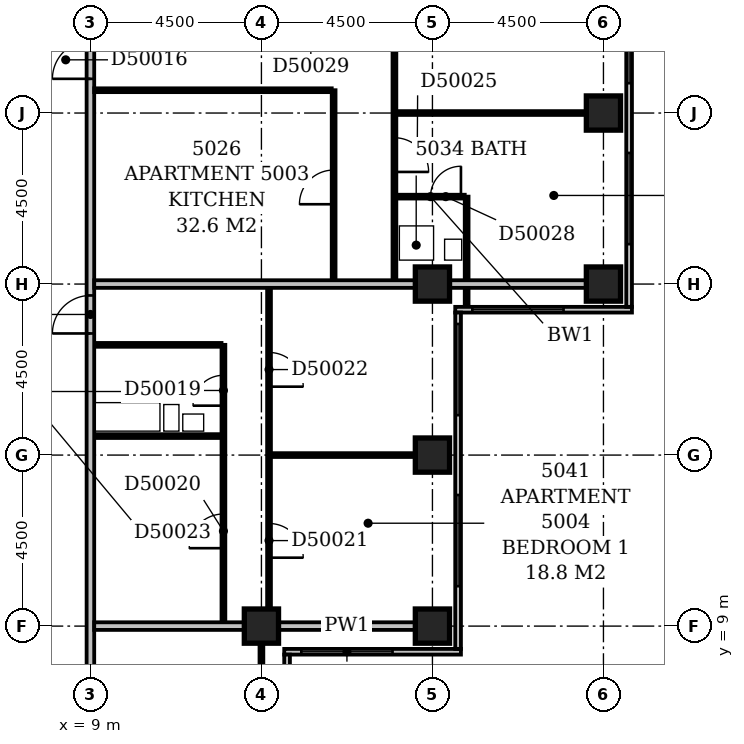
"""IFC4 building model, lengths in metres.
Left out: names, types, materials, properties, quantities, classifications, styles, units other than length and angle.
Written with IfcOpenShell. Run it as: python <this file> out.ifc"""

import sys

from ifc_helpers import new_model, si_unit, direction, frame, frame_2d, origin, origin_2d, place, context, subcontext, project, spatial, rectangle, extrude, element, fill, save


model = new_model("IFC4")
c1 = context("Model", 3, precision=1e-05, world=origin(), true_north=direction((0.0, 1.0)))
c2 = subcontext(c1, "Body", "Model", "MODEL_VIEW")
j1 = project(units=[si_unit("LENGTHUNIT", "METRE"), si_unit("PLANEANGLEUNIT", "RADIAN")], contexts=[c1])
p1 = place(None, origin())
s1 = spatial("IfcSite", under=j1, at=p1, CompositionType="ELEMENT")
p2 = place(p1, origin())
s2 = spatial("IfcBuilding", under=s1, at=p2, CompositionType="ELEMENT")
p3 = place(p2, frame((0.0, 0.0, 197.0)))
s3 = spatial("IfcBuildingStorey", under=s2, at=p3, CompositionType="ELEMENT", Elevation=197.0)
for number, where, z_axis, x_axis in (
    (1, (13.5, 9.0, -0.3), (0.0, 0.0, 1.0), (1.0, 0.0, 0.0)),
    (2, (18.0, 9.0, -0.3), (0.0, 0.0, 1.0), (1.0, 0.0, 0.0)),
    (3, (18.0, 13.5, -0.3), (0.0, 0.0, 1.0), (1.0, 0.0, 0.0)),
    (4, (18.0, 18.0, -0.3), (0.0, 0.0, 1.0), (1.0, 0.0, 0.0)),
    (5, (22.5, 18.0, -0.3), (0.0, 0.0, 1.0), (1.0, 0.0, 0.0)),
    (6, (22.5, 22.5, -0.3), (0.0, 0.0, 1.0), (1.0, 0.0, 0.0)),
):
    element("IfcColumn", number, at=place(p3, frame(where, z_axis=z_axis, x_axis=x_axis)), inside=s3, PredefinedType="COLUMN", context=c2, shape_type="SweptSolid", body=[
        extrude(rectangle(XDim=0.9, YDim=0.9, at=origin_2d()), origin(), (0.0, 0.0, 1.0), 3.6),
    ])
p4 = place(p3, frame((14.175, 3.9, 0.0), z_axis=(0.0, 0.0, 1.0), x_axis=(0.0, 1.0, 0.0)))
e7 = element("IfcWall", 7, at=p4, inside=s3, PredefinedType="STANDARD", context=c2, shape_type="SweptSolid", body=[
    extrude(rectangle(XDim=4.35, YDim=0.15, at=frame_2d((2.175, 0.0))), origin(), (0.0, 0.0, 1.0), 2.7),
])
p5 = place(p4, frame((1.65, 0.0, 0.6)))
e8 = element("IfcOpeningElement", 8, at=p5, cuts=e7, PredefinedType="OPENING", context=c2, shape_type="SweptSolid", body=[
    extrude(rectangle(XDim=2.4, YDim=1.8, at=frame_2d((1.2, 0.9))), frame((0.0, 0.087, 0.0), z_axis=(0.0, -1.0, 0.0), x_axis=(1.0, 0.0, 0.0)), (0.0, 0.0, 1.0), 0.174),
])
p6 = place(p3, frame((14.1, 8.325, 0.0), z_axis=(0.0, 0.0, 1.0), x_axis=(1.0, 0.0, 0.0)))
e9 = element("IfcWall", 9, at=p6, inside=s3, PredefinedType="STANDARD", context=c2, shape_type="SweptSolid", body=[
    extrude(rectangle(XDim=4.65, YDim=0.15, at=frame_2d((2.325, 0.0))), origin(), (0.0, 0.0, 1.0), 2.7),
])
p7 = place(p6, frame((0.45, 0.0, 0.6)))
e10 = element("IfcOpeningElement", 10, at=p7, cuts=e9, PredefinedType="OPENING", context=c2, shape_type="SweptSolid", body=[
    extrude(rectangle(XDim=2.4, YDim=1.8, at=frame_2d((1.2, 0.9))), frame((0.0, 0.087, 0.0), z_axis=(0.0, -1.0, 0.0), x_axis=(1.0, 0.0, 0.0)), (0.0, 0.0, 1.0), 0.174),
])
p8 = place(p3, frame((18.675, 8.4, 0.0), z_axis=(0.0, 0.0, 1.0), x_axis=(0.0, 1.0, 0.0)))
e11 = element("IfcWall", 11, at=p8, inside=s3, PredefinedType="STANDARD", context=c2, shape_type="SweptSolid", body=[
    extrude(rectangle(XDim=8.85, YDim=0.15, at=frame_2d((4.425, 0.0))), origin(), (0.0, 0.0, 1.0), 2.7),
])
p9 = place(p8, frame((1.65, 0.0, 0.6)))
e12 = element("IfcOpeningElement", 12, at=p9, cuts=e11, PredefinedType="OPENING", context=c2, shape_type="SweptSolid", body=[
    extrude(rectangle(XDim=2.4, YDim=1.8, at=frame_2d((1.2, 0.9))), frame((0.0, 0.087, 0.0), z_axis=(0.0, -1.0, 0.0), x_axis=(1.0, 0.0, 0.0)), (0.0, 0.0, 1.0), 0.174),
])
p10 = place(p8, frame((6.15, 0.0, 0.6)))
e13 = element("IfcOpeningElement", 13, at=p10, cuts=e11, PredefinedType="OPENING", context=c2, shape_type="SweptSolid", body=[
    extrude(rectangle(XDim=2.4, YDim=1.8, at=frame_2d((1.2, 0.9))), frame((0.0, 0.087, 0.0), z_axis=(0.0, -1.0, 0.0), x_axis=(1.0, 0.0, 0.0)), (0.0, 0.0, 1.0), 0.174),
])
p11 = place(p3, frame((18.6, 17.325, 0.0), z_axis=(0.0, 0.0, 1.0), x_axis=(1.0, 0.0, 0.0)))
e14 = element("IfcWall", 14, at=p11, inside=s3, PredefinedType="STANDARD", context=c2, shape_type="SweptSolid", body=[
    extrude(rectangle(XDim=4.65, YDim=0.15, at=frame_2d((2.325, 0.0))), origin(), (0.0, 0.0, 1.0), 2.7),
])
p12 = place(p11, frame((0.45, 0.0, 0.6)))
e15 = element("IfcOpeningElement", 15, at=p12, cuts=e14, PredefinedType="OPENING", context=c2, shape_type="SweptSolid", body=[
    extrude(rectangle(XDim=2.4, YDim=1.8, at=frame_2d((1.2, 0.9))), frame((0.0, 0.087, 0.0), z_axis=(0.0, -1.0, 0.0), x_axis=(1.0, 0.0, 0.0)), (0.0, 0.0, 1.0), 0.174),
])
p13 = place(p3, frame((23.175, 17.4, 0.0), z_axis=(0.0, 0.0, 1.0), x_axis=(0.0, 1.0, 0.0)))
e16 = element("IfcWall", 16, at=p13, inside=s3, PredefinedType="STANDARD", context=c2, shape_type="SweptSolid", body=[
    extrude(rectangle(XDim=17.85, YDim=0.15, at=frame_2d((8.925, 0.0))), origin(), (0.0, 0.0, 1.0), 2.7),
])
p14 = place(p13, frame((1.65, 0.0, 0.6)))
e17 = element("IfcOpeningElement", 17, at=p14, cuts=e16, PredefinedType="OPENING", context=c2, shape_type="SweptSolid", body=[
    extrude(rectangle(XDim=2.4, YDim=1.8, at=frame_2d((1.2, 0.9))), frame((0.0, 0.087, 0.0), z_axis=(0.0, -1.0, 0.0), x_axis=(1.0, 0.0, 0.0)), (0.0, 0.0, 1.0), 0.174),
])
p15 = place(p13, frame((5.885, 0.0, 0.6)))
e18 = element("IfcOpeningElement", 18, at=p15, cuts=e16, PredefinedType="OPENING", context=c2, shape_type="SweptSolid", body=[
    extrude(rectangle(XDim=2.4, YDim=1.8, at=frame_2d((1.2, 0.9))), frame((0.0, 0.087, 0.0), z_axis=(0.0, -1.0, 0.0), x_axis=(1.0, 0.0, 0.0)), (0.0, 0.0, 1.0), 0.174),
])
p16 = place(p13, frame((10.65, 0.0, 0.6)))
e19 = element("IfcOpeningElement", 19, at=p16, cuts=e16, PredefinedType="OPENING", context=c2, shape_type="SweptSolid", body=[
    extrude(rectangle(XDim=2.4, YDim=1.8, at=frame_2d((1.2, 0.9))), frame((0.0, 0.087, 0.0), z_axis=(0.0, -1.0, 0.0), x_axis=(1.0, 0.0, 0.0)), (0.0, 0.0, 1.0), 0.174),
])
p17 = place(p13, frame((15.15, 0.0, 0.6)))
e20 = element("IfcOpeningElement", 20, at=p17, cuts=e16, PredefinedType="OPENING", context=c2, shape_type="SweptSolid", body=[
    extrude(rectangle(XDim=2.4, YDim=1.8, at=frame_2d((1.2, 0.9))), frame((0.0, 0.087, 0.0), z_axis=(0.0, -1.0, 0.0), x_axis=(1.0, 0.0, 0.0)), (0.0, 0.0, 1.0), 0.174),
])
p18 = place(p3, frame((13.5, 4.95, 0.0), z_axis=(0.0, 0.0, 1.0), x_axis=(0.0, 1.0, 0.0)))
e21 = element("IfcWall", 21, at=p18, inside=s3, PredefinedType="PARTITIONING", context=c2, shape_type="SweptSolid", body=[
    extrude(rectangle(XDim=3.6, YDim=0.1, at=frame_2d((1.8, 0.0))), origin(), (0.0, 0.0, 1.0), 2.7),
])
p19 = place(p3, frame((9.0, 5.0, 0.0), z_axis=(0.0, 0.0, 1.0), x_axis=(0.0, 1.0, 0.0)))
e22 = element("IfcWall", 22, at=p19, inside=s3, PredefinedType="PARTITIONING", context=c2, shape_type="SweptSolid", body=[
    extrude(rectangle(XDim=31.0, YDim=0.2, at=frame_2d((15.5, 0.0))), origin(), (0.0, 0.0, 1.0), 3.3),
])
p20 = place(p19, frame((18.4, 0.0, 0.0)))
e23 = element("IfcOpeningElement", 23, at=p20, cuts=e22, PredefinedType="OPENING", context=c2, shape_type="SweptSolid", body=[
    extrude(rectangle(XDim=1.0, YDim=2.1, at=frame_2d((0.5, 1.05))), frame((0.0, 0.112, 0.0), z_axis=(0.0, -1.0, 0.0), x_axis=(1.0, 0.0, 0.0)), (0.0, 0.0, 1.0), 0.224),
])
p21 = place(p19, frame((11.7, 0.0, 0.0)))
e24 = element("IfcOpeningElement", 24, at=p21, cuts=e22, PredefinedType="OPENING", context=c2, shape_type="SweptSolid", body=[
    extrude(rectangle(XDim=1.0, YDim=2.1, at=frame_2d((0.5, 1.05))), frame((0.0, 0.112, 0.0), z_axis=(0.0, -1.0, 0.0), x_axis=(1.0, 0.0, 0.0)), (0.0, 0.0, 1.0), 0.224),
])
p22 = place(p19, frame((1.5, 0.0, 0.0)))
e25 = element("IfcOpeningElement", 25, at=p22, cuts=e22, PredefinedType="OPENING", context=c2, shape_type="SweptSolid", body=[
    extrude(rectangle(XDim=0.9, YDim=2.1, at=frame_2d((0.45, 1.05))), frame((0.0, 0.112, 0.0), z_axis=(0.0, -1.0, 0.0), x_axis=(1.0, 0.0, 0.0)), (0.0, 0.0, 1.0), 0.224),
])
p23 = place(p3, frame((9.1, 9.0, 0.0), z_axis=(0.0, 0.0, 1.0), x_axis=(1.0, 0.0, 0.0)))
e26 = element("IfcWall", 26, at=p23, inside=s3, PredefinedType="PARTITIONING", context=c2, shape_type="SweptSolid", body=[
    extrude(rectangle(XDim=3.95, YDim=0.2, at=frame_2d((1.975, 0.0))), origin(), (0.0, 0.0, 1.0), 3.3),
])
p24 = place(p3, frame((13.95, 9.0, 0.0), z_axis=(0.0, 0.0, 1.0), x_axis=(1.0, 0.0, 0.0)))
e27 = element("IfcWall", 27, at=p24, inside=s3, PredefinedType="PARTITIONING", context=c2, shape_type="SweptSolid", body=[
    extrude(rectangle(XDim=3.6, YDim=0.2, at=frame_2d((1.8, 0.0))), origin(), (0.0, 0.0, 1.0), 2.7),
])
p25 = place(p3, frame((12.5, 9.1, 0.0), z_axis=(0.0, 0.0, 1.0), x_axis=(0.0, 1.0, 0.0)))
e28 = element("IfcWall", 28, at=p25, inside=s3, PredefinedType="PARTITIONING", context=c2, shape_type="SweptSolid", body=[
    extrude(rectangle(XDim=7.3, YDim=0.1, at=frame_2d((3.65, 0.0))), origin(), (0.0, 0.0, 1.0), 3.3),
])
p26 = place(p25, frame((5.7, 0.0, 0.0)))
e29 = element("IfcOpeningElement", 29, at=p26, cuts=e28, PredefinedType="OPENING", context=c2, shape_type="SweptSolid", body=[
    extrude(rectangle(XDim=0.8, YDim=2.1, at=frame_2d((0.4, 1.05))), frame((0.0, 0.062, 0.0), z_axis=(0.0, -1.0, 0.0), x_axis=(1.0, 0.0, 0.0)), (0.0, 0.0, 1.0), 0.124),
])
p27 = place(p25, frame((1.95, 0.0, 0.0)))
e30 = element("IfcOpeningElement", 30, at=p27, cuts=e28, PredefinedType="OPENING", context=c2, shape_type="SweptSolid", body=[
    extrude(rectangle(XDim=0.9, YDim=2.1, at=frame_2d((0.45, 1.05))), frame((0.0, 0.062, 0.0), z_axis=(0.0, -1.0, 0.0), x_axis=(1.0, 0.0, 0.0)), (0.0, 0.0, 1.0), 0.124),
])
p28 = place(p3, frame((13.7, 9.45, 0.0), z_axis=(0.0, 0.0, 1.0), x_axis=(0.0, 1.0, 0.0)))
e31 = element("IfcWall", 31, at=p28, inside=s3, PredefinedType="PARTITIONING", context=c2, shape_type="SweptSolid", body=[
    extrude(rectangle(XDim=8.45, YDim=0.1, at=frame_2d((4.225, 0.0))), origin(), (0.0, 0.0, 1.0), 3.3),
])
p29 = place(p28, frame((1.35, 0.0, 0.0)))
e32 = element("IfcOpeningElement", 32, at=p29, cuts=e31, PredefinedType="OPENING", context=c2, shape_type="SweptSolid", body=[
    extrude(rectangle(XDim=0.9, YDim=2.1, at=frame_2d((0.45, 1.05))), frame((0.0, 0.062, 0.0), z_axis=(0.0, -1.0, 0.0), x_axis=(1.0, 0.0, 0.0)), (0.0, 0.0, 1.0), 0.124),
])
p30 = place(p28, frame((5.85, 0.0, 0.0)))
e33 = element("IfcOpeningElement", 33, at=p30, cuts=e31, PredefinedType="OPENING", context=c2, shape_type="SweptSolid", body=[
    extrude(rectangle(XDim=0.9, YDim=2.1, at=frame_2d((0.45, 1.05))), frame((0.0, 0.062, 0.0), z_axis=(0.0, -1.0, 0.0), x_axis=(1.0, 0.0, 0.0)), (0.0, 0.0, 1.0), 0.124),
])
p31 = place(p3, frame((13.75, 13.5, 0.0), z_axis=(0.0, 0.0, 1.0), x_axis=(1.0, 0.0, 0.0)))
e34 = element("IfcWall", 34, at=p31, inside=s3, PredefinedType="PARTITIONING", context=c2, shape_type="SweptSolid", body=[
    extrude(rectangle(XDim=3.8, YDim=0.1, at=frame_2d((1.9, 0.0))), origin(), (0.0, 0.0, 1.0), 3.3),
])
for number, where, z_axis, x_axis in (
    (35, (9.1, 14.0, 0.0), (0.0, 0.0, 1.0), (1.0, 0.0, 0.0)),
    (36, (9.1, 16.4, 0.0), (0.0, 0.0, 1.0), (1.0, 0.0, 0.0)),
):
    element("IfcWall", number, at=place(p3, frame(where, z_axis=z_axis, x_axis=x_axis)), inside=s3, PredefinedType="PLUMBINGWALL", context=c2, shape_type="SweptSolid", body=[
        extrude(rectangle(XDim=3.35, YDim=0.1, at=frame_2d((1.675, 0.0))), origin(), (0.0, 0.0, 1.0), 3.3),
    ])
p32 = place(p3, frame((18.9, 17.4, 0.0), z_axis=(0.0, 0.0, 1.0), x_axis=(0.0, 1.0, 0.0)))
e37 = element("IfcWall", 37, at=p32, inside=s3, PredefinedType="PLUMBINGWALL", context=c2, shape_type="SweptSolid", body=[
    extrude(rectangle(XDim=2.9, YDim=0.1, at=frame_2d((1.45, 0.0))), origin(), (0.0, 0.0, 1.0), 3.3),
])
p33 = place(p3, frame((9.1, 18.0, 0.0), z_axis=(0.0, 0.0, 1.0), x_axis=(1.0, 0.0, 0.0)))
e38 = element("IfcWall", 38, at=p33, inside=s3, PredefinedType="PARTITIONING", context=c2, shape_type="SweptSolid", body=[
    extrude(rectangle(XDim=8.45, YDim=0.2, at=frame_2d((4.225, 0.0))), origin(), (0.0, 0.0, 1.0), 2.6),
])
p34 = place(p3, frame((18.45, 18.0, 0.0), z_axis=(0.0, 0.0, 1.0), x_axis=(1.0, 0.0, 0.0)))
e39 = element("IfcWall", 39, at=p34, inside=s3, PredefinedType="PARTITIONING", context=c2, shape_type="SweptSolid", body=[
    extrude(rectangle(XDim=3.6, YDim=0.2, at=frame_2d((1.8, 0.0))), origin(), (0.0, 0.0, 1.0), 2.7),
])
p35 = place(p3, frame((15.4, 18.1, 0.0), z_axis=(0.0, 0.0, 1.0), x_axis=(0.0, 1.0, 0.0)))
e40 = element("IfcWall", 40, at=p35, inside=s3, PredefinedType="PARTITIONING", context=c2, shape_type="SweptSolid", body=[
    extrude(rectangle(XDim=5.0, YDim=0.1, at=frame_2d((2.5, 0.0))), origin(), (0.0, 0.0, 1.0), 3.3),
])
p36 = place(p35, frame((2.0, 0.0, 0.0)))
e41 = element("IfcOpeningElement", 41, at=p36, cuts=e40, PredefinedType="OPENING", context=c2, shape_type="SweptSolid", body=[
    extrude(rectangle(XDim=0.9, YDim=2.1, at=frame_2d((0.45, 1.05))), frame((0.0, 0.062, 0.0), z_axis=(0.0, -1.0, 0.0), x_axis=(1.0, 0.0, 0.0)), (0.0, 0.0, 1.0), 0.124),
])
p37 = place(p3, frame((17.0, 18.1, 0.0), z_axis=(0.0, 0.0, 1.0), x_axis=(0.0, 1.0, 0.0)))
e42 = element("IfcWall", 42, at=p37, inside=s3, PredefinedType="PARTITIONING", context=c2, shape_type="SweptSolid", body=[
    extrude(rectangle(XDim=17.8, YDim=0.1, at=frame_2d((8.9, 0.0))), origin(), (0.0, 0.0, 1.0), 3.3),
])
p38 = place(p37, frame((2.85, 0.0, 0.0)))
e43 = element("IfcOpeningElement", 43, at=p38, cuts=e42, PredefinedType="OPENING", context=c2, shape_type="SweptSolid", body=[
    extrude(rectangle(XDim=0.9, YDim=2.1, at=frame_2d((0.45, 1.05))), frame((0.0, 0.062, 0.0), z_axis=(0.0, -1.0, 0.0), x_axis=(1.0, 0.0, 0.0)), (0.0, 0.0, 1.0), 0.124),
])
p39 = place(p37, frame((8.4, 0.0, 0.0)))
e44 = element("IfcOpeningElement", 44, at=p39, cuts=e42, PredefinedType="OPENING", context=c2, shape_type="SweptSolid", body=[
    extrude(rectangle(XDim=0.9, YDim=2.1, at=frame_2d((0.45, 1.05))), frame((0.0, 0.062, 0.0), z_axis=(0.0, -1.0, 0.0), x_axis=(1.0, 0.0, 0.0)), (0.0, 0.0, 1.0), 0.124),
])
p40 = place(p37, frame((14.05, 0.0, 0.0)))
e45 = element("IfcOpeningElement", 45, at=p40, cuts=e42, PredefinedType="OPENING", context=c2, shape_type="SweptSolid", body=[
    extrude(rectangle(XDim=0.9, YDim=2.1, at=frame_2d((0.45, 1.05))), frame((0.0, 0.062, 0.0), z_axis=(0.0, -1.0, 0.0), x_axis=(1.0, 0.0, 0.0)), (0.0, 0.0, 1.0), 0.124),
])
p41 = place(p3, frame((17.05, 20.3, 0.0), z_axis=(0.0, 0.0, 1.0), x_axis=(1.0, 0.0, 0.0)))
e46 = element("IfcWall", 46, at=p41, inside=s3, PredefinedType="PLUMBINGWALL", context=c2, shape_type="SweptSolid", body=[
    extrude(rectangle(XDim=1.8, YDim=0.1, at=frame_2d((0.9, 0.0))), origin(), (0.0, 0.0, 1.0), 3.3),
])
p42 = place(p41, frame((0.9, 0.0, 0.0)))
e47 = element("IfcOpeningElement", 47, at=p42, cuts=e46, PredefinedType="OPENING", context=c2, shape_type="SweptSolid", body=[
    extrude(rectangle(XDim=0.8, YDim=2.1, at=frame_2d((0.4, 1.05))), frame((0.0, 0.062, 0.0), z_axis=(0.0, -1.0, 0.0), x_axis=(1.0, 0.0, 0.0)), (0.0, 0.0, 1.0), 0.124),
])
p43 = place(p3, frame((17.05, 22.5, 0.0), z_axis=(0.0, 0.0, 1.0), x_axis=(1.0, 0.0, 0.0)))
e48 = element("IfcWall", 48, at=p43, inside=s3, PredefinedType="PARTITIONING", context=c2, shape_type="SweptSolid", body=[
    extrude(rectangle(XDim=5.0, YDim=0.1, at=frame_2d((2.5, 0.0))), origin(), (0.0, 0.0, 1.0), 3.3),
])
p44 = place(p3, frame((9.1, 23.1, 0.0), z_axis=(0.0, 0.0, 1.0), x_axis=(1.0, 0.0, 0.0)))
e49 = element("IfcWall", 49, at=p44, inside=s3, PredefinedType="PARTITIONING", context=c2, shape_type="SweptSolid", body=[
    extrude(rectangle(XDim=6.25, YDim=0.1, at=frame_2d((3.125, 0.0))), origin(), (0.0, 0.0, 1.0), 3.3),
])
p45 = place(p7, origin())
e50 = element("IfcWindow", 50, at=p45, inside=s3, PartitioningType="SINGLE_PANEL", PredefinedType="WINDOW", context=c2, shape_type="SweptSolid", body=[
    extrude(rectangle(XDim=2.4, YDim=1.8, at=frame_2d((1.2, 0.9))), frame((0.0, 0.03, 0.0), z_axis=(0.0, -1.0, 0.0), x_axis=(1.0, 0.0, 0.0)), (0.0, 0.0, 1.0), 0.06),
])
fill(e10, e50)
p46 = place(p9, origin())
e51 = element("IfcWindow", 51, at=p46, inside=s3, PartitioningType="SINGLE_PANEL", PredefinedType="WINDOW", context=c2, shape_type="SweptSolid", body=[
    extrude(rectangle(XDim=2.4, YDim=1.8, at=frame_2d((1.2, 0.9))), frame((0.0, 0.03, 0.0), z_axis=(0.0, -1.0, 0.0), x_axis=(1.0, 0.0, 0.0)), (0.0, 0.0, 1.0), 0.06),
])
fill(e12, e51)
p47 = place(p10, origin())
e52 = element("IfcWindow", 52, at=p47, inside=s3, PartitioningType="SINGLE_PANEL", PredefinedType="WINDOW", context=c2, shape_type="SweptSolid", body=[
    extrude(rectangle(XDim=2.4, YDim=1.8, at=frame_2d((1.2, 0.9))), frame((0.0, 0.03, 0.0), z_axis=(0.0, -1.0, 0.0), x_axis=(1.0, 0.0, 0.0)), (0.0, 0.0, 1.0), 0.06),
])
fill(e13, e52)
p48 = place(p12, origin())
e53 = element("IfcWindow", 53, at=p48, inside=s3, PartitioningType="SINGLE_PANEL", PredefinedType="WINDOW", context=c2, shape_type="SweptSolid", body=[
    extrude(rectangle(XDim=2.4, YDim=1.8, at=frame_2d((1.2, 0.9))), frame((0.0, 0.03, 0.0), z_axis=(0.0, -1.0, 0.0), x_axis=(1.0, 0.0, 0.0)), (0.0, 0.0, 1.0), 0.06),
])
fill(e15, e53)
p49 = place(p14, origin())
e54 = element("IfcWindow", 54, at=p49, inside=s3, PartitioningType="SINGLE_PANEL", PredefinedType="WINDOW", context=c2, shape_type="SweptSolid", body=[
    extrude(rectangle(XDim=2.4, YDim=1.8, at=frame_2d((1.2, 0.9))), frame((0.0, 0.03, 0.0), z_axis=(0.0, -1.0, 0.0), x_axis=(1.0, 0.0, 0.0)), (0.0, 0.0, 1.0), 0.06),
])
fill(e17, e54)
p50 = place(p15, origin())
e55 = element("IfcWindow", 55, at=p50, inside=s3, PartitioningType="SINGLE_PANEL", PredefinedType="WINDOW", context=c2, shape_type="SweptSolid", body=[
    extrude(rectangle(XDim=2.4, YDim=1.8, at=frame_2d((1.2, 0.9))), frame((0.0, 0.03, 0.0), z_axis=(0.0, -1.0, 0.0), x_axis=(1.0, 0.0, 0.0)), (0.0, 0.0, 1.0), 0.06),
])
fill(e18, e55)
p51 = place(p20, origin())
e56 = element("IfcDoor", 56, at=p51, inside=s3, OperationType="SINGLE_SWING_LEFT", PredefinedType="DOOR", context=c2, shape_type="SweptSolid", body=[
    extrude(rectangle(XDim=1.0, YDim=2.1, at=frame_2d((0.5, 1.05))), frame((0.0, 0.025, 0.0), z_axis=(0.0, -1.0, 0.0), x_axis=(1.0, 0.0, 0.0)), (0.0, 0.0, 1.0), 0.05),
])
fill(e23, e56)
p52 = place(p21, origin())
e57 = element("IfcDoor", 57, at=p52, inside=s3, OperationType="SINGLE_SWING_LEFT", PredefinedType="DOOR", context=c2, shape_type="SweptSolid", body=[
    extrude(rectangle(XDim=1.0, YDim=2.1, at=frame_2d((0.5, 1.05))), frame((0.0, 0.025, 0.0), z_axis=(0.0, -1.0, 0.0), x_axis=(1.0, 0.0, 0.0)), (0.0, 0.0, 1.0), 0.05),
])
fill(e24, e57)
p53 = place(p26, origin())
e58 = element("IfcDoor", 58, at=p53, inside=s3, OperationType="SINGLE_SWING_LEFT", PredefinedType="DOOR", context=c2, shape_type="SweptSolid", body=[
    extrude(rectangle(XDim=0.8, YDim=2.1, at=frame_2d((0.4, 1.05))), frame((0.0, 0.025, 0.0), z_axis=(0.0, -1.0, 0.0), x_axis=(1.0, 0.0, 0.0)), (0.0, 0.0, 1.0), 0.05),
])
fill(e29, e58)
p54 = place(p27, origin())
e59 = element("IfcDoor", 59, at=p54, inside=s3, OperationType="SINGLE_SWING_LEFT", PredefinedType="DOOR", context=c2, shape_type="SweptSolid", body=[
    extrude(rectangle(XDim=0.9, YDim=2.1, at=frame_2d((0.45, 1.05))), frame((0.0, 0.025, 0.0), z_axis=(0.0, -1.0, 0.0), x_axis=(1.0, 0.0, 0.0)), (0.0, 0.0, 1.0), 0.05),
])
fill(e30, e59)
p55 = place(p29, frame((0.9, 0.0, 0.0), z_axis=(0.0, 0.0, 1.0), x_axis=(-1.0, 0.0, 0.0)))
e60 = element("IfcDoor", 60, at=p55, inside=s3, OperationType="SINGLE_SWING_RIGHT", PredefinedType="DOOR", context=c2, shape_type="SweptSolid", body=[
    extrude(rectangle(XDim=0.9, YDim=2.1, at=frame_2d((0.45, 1.05))), frame((0.0, 0.025, 0.0), z_axis=(0.0, -1.0, 0.0), x_axis=(1.0, 0.0, 0.0)), (0.0, 0.0, 1.0), 0.05),
])
fill(e32, e60)
p56 = place(p30, frame((0.9, 0.0, 0.0), z_axis=(0.0, 0.0, 1.0), x_axis=(-1.0, 0.0, 0.0)))
e61 = element("IfcDoor", 61, at=p56, inside=s3, OperationType="SINGLE_SWING_RIGHT", PredefinedType="DOOR", context=c2, shape_type="SweptSolid", body=[
    extrude(rectangle(XDim=0.9, YDim=2.1, at=frame_2d((0.45, 1.05))), frame((0.0, 0.025, 0.0), z_axis=(0.0, -1.0, 0.0), x_axis=(1.0, 0.0, 0.0)), (0.0, 0.0, 1.0), 0.05),
])
fill(e33, e61)
p57 = place(p36, origin())
e62 = element("IfcDoor", 62, at=p57, inside=s3, OperationType="SINGLE_SWING_LEFT", PredefinedType="DOOR", context=c2, shape_type="SweptSolid", body=[
    extrude(rectangle(XDim=0.9, YDim=2.1, at=frame_2d((0.45, 1.05))), frame((0.0, 0.025, 0.0), z_axis=(0.0, -1.0, 0.0), x_axis=(1.0, 0.0, 0.0)), (0.0, 0.0, 1.0), 0.05),
])
fill(e41, e62)
p58 = place(p38, frame((0.9, 0.0, 0.0), z_axis=(0.0, 0.0, 1.0), x_axis=(-1.0, 0.0, 0.0)))
e63 = element("IfcDoor", 63, at=p58, inside=s3, OperationType="SINGLE_SWING_RIGHT", PredefinedType="DOOR", context=c2, shape_type="SweptSolid", body=[
    extrude(rectangle(XDim=0.9, YDim=2.1, at=frame_2d((0.45, 1.05))), frame((0.0, 0.025, 0.0), z_axis=(0.0, -1.0, 0.0), x_axis=(1.0, 0.0, 0.0)), (0.0, 0.0, 1.0), 0.05),
])
fill(e43, e63)
p59 = place(p42, frame((0.8, 0.0, 0.0), z_axis=(0.0, 0.0, 1.0), x_axis=(-1.0, 0.0, 0.0)))
e64 = element("IfcDoor", 64, at=p59, inside=s3, OperationType="SINGLE_SWING_LEFT", PredefinedType="DOOR", context=c2, shape_type="SweptSolid", body=[
    extrude(rectangle(XDim=0.8, YDim=2.1, at=frame_2d((0.4, 1.05))), frame((0.0, 0.025, 0.0), z_axis=(0.0, -1.0, 0.0), x_axis=(1.0, 0.0, 0.0)), (0.0, 0.0, 1.0), 0.05),
])
fill(e47, e64)
save(model, sys.argv[1])
